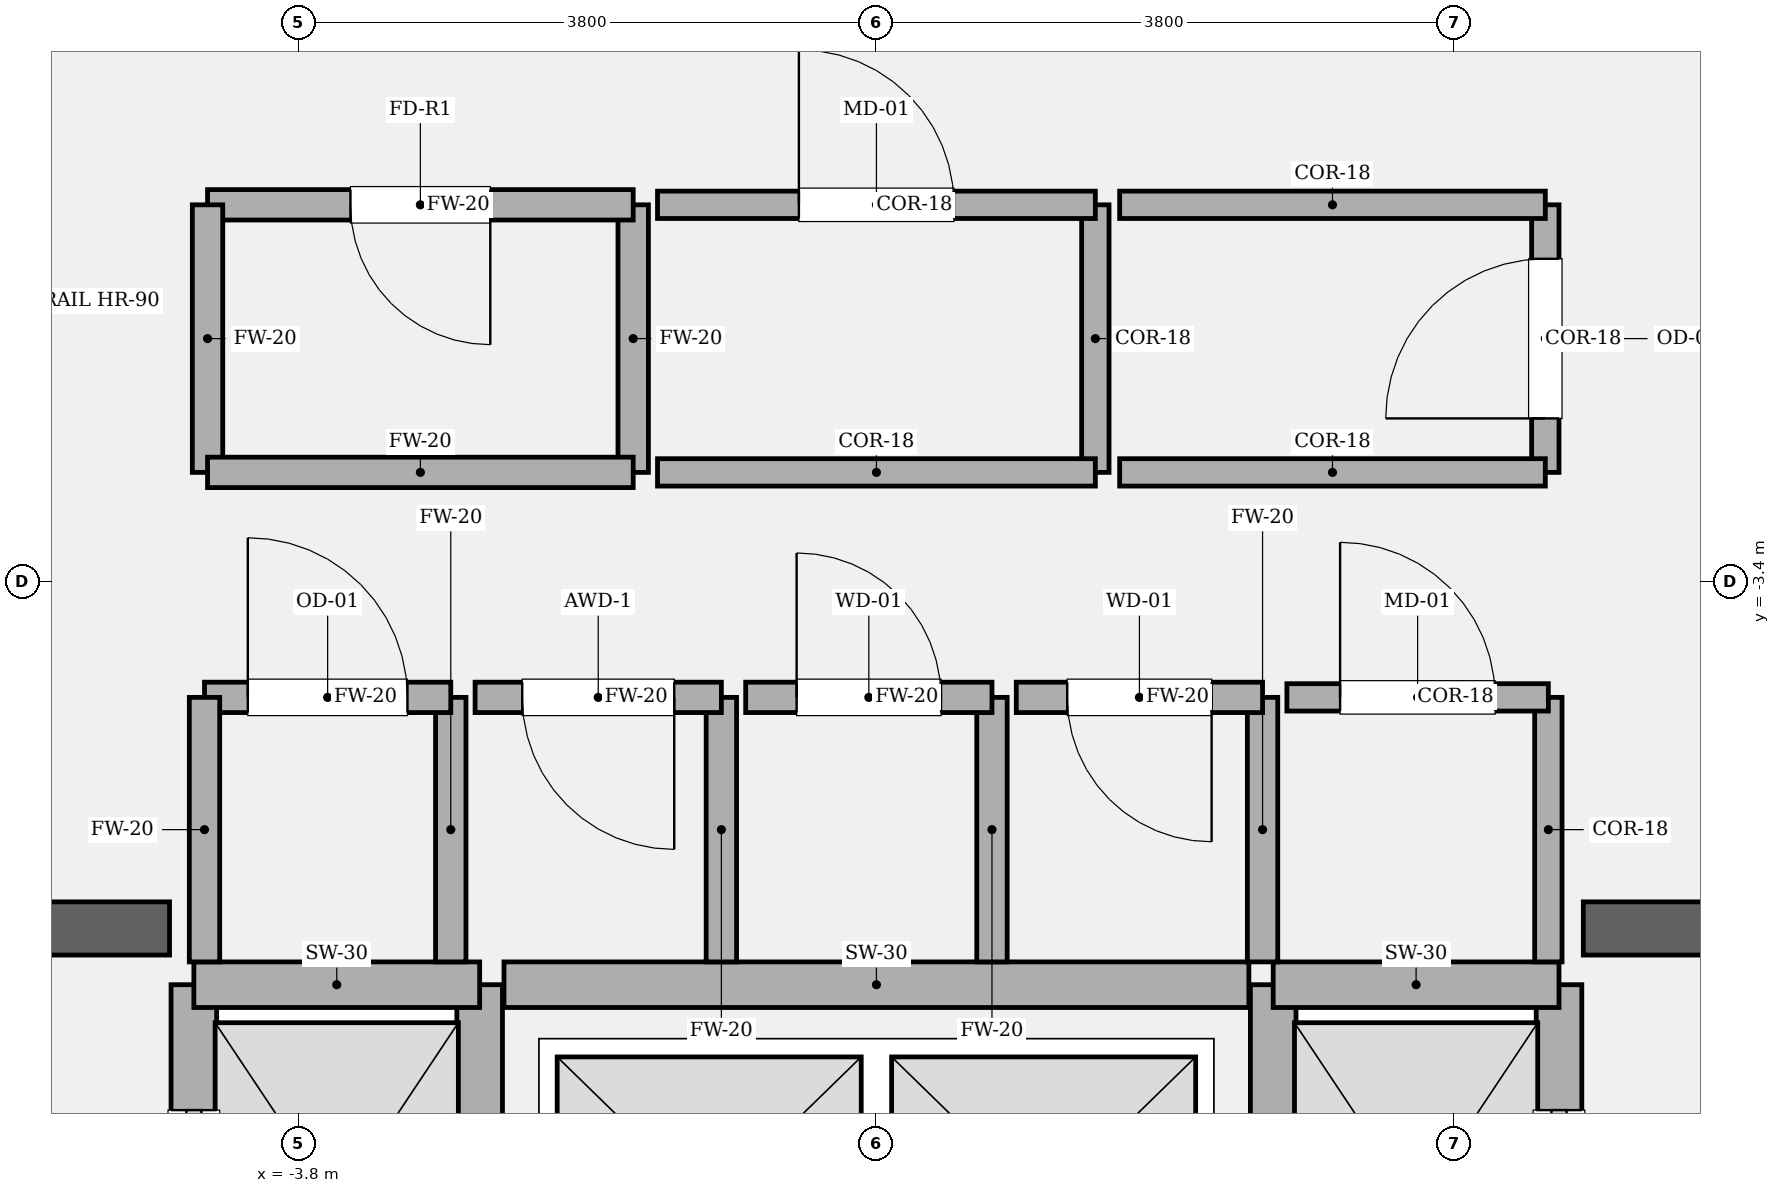
"""IFC4 building model, lengths in metres.
Left out: names, types, materials, properties, quantities, classifications, styles, units other than length and angle.
Written with IfcOpenShell. Run it as: python <this file> out.ifc"""

import sys

from ifc_helpers import new_model, si_unit, direction, frame, frame_2d, origin, place, context, subcontext, project, spatial, rectangle, extrude, element, fill, save


model = new_model("IFC4")
c1 = context("Model", 3, precision=1e-05, world=origin(), true_north=direction((0.0, 1.0)))
c2 = subcontext(c1, "Body", "Model", "MODEL_VIEW")
j1 = project(units=[si_unit("LENGTHUNIT", "METRE"), si_unit("PLANEANGLEUNIT", "RADIAN")], contexts=[c1])
p1 = place(None, origin())
s1 = spatial("IfcSite", under=j1, at=p1, CompositionType="ELEMENT")
p2 = place(p1, origin())
s2 = spatial("IfcBuilding", under=s1, at=p2, CompositionType="ELEMENT")
p3 = place(p2, frame((0.0, 0.0, 339.0)))
s3 = spatial("IfcBuildingStorey", under=s2, at=p3, CompositionType="ELEMENT", Elevation=339.0)
p4 = place(p3, frame((-9.975, -5.68, 0.0), z_axis=(0.0, 0.0, 1.0), x_axis=(1.0, 0.0, 0.0)))
e1 = element("IfcWall", 1, at=p4, inside=s3, PredefinedType="SOLIDWALL", context=c2, shape_type="SweptSolid", body=[
    extrude(rectangle(XDim=5.325, YDim=0.35, at=frame_2d((2.663, 0.0))), origin(), (0.0, 0.0, 1.0), 4.8),
])
p5 = place(p4, frame((1.435, 0.0, 0.0)))
e2 = element("IfcOpeningElement", 2, at=p5, cuts=e1, PredefinedType="OPENING", context=c2, shape_type="SweptSolid", body=[
    extrude(rectangle(XDim=1.18, YDim=2.2, at=frame_2d((0.59, 1.1))), frame((0.0, 0.185, 0.0), z_axis=(0.0, -1.0, 0.0), x_axis=(1.0, 0.0, 0.0)), (0.0, 0.0, 1.0), 0.37),
])
p6 = place(p3, frame((4.65, -5.68, 0.0), z_axis=(0.0, 0.0, 1.0), x_axis=(1.0, 0.0, 0.0)))
e3 = element("IfcWall", 3, at=p6, inside=s3, PredefinedType="SOLIDWALL", context=c2, shape_type="SweptSolid", body=[
    extrude(rectangle(XDim=5.325, YDim=0.35, at=frame_2d((2.663, 0.0))), origin(), (0.0, 0.0, 1.0), 4.8),
])
p7 = place(p6, frame((2.71, 0.0, 0.0)))
e4 = element("IfcOpeningElement", 4, at=p7, cuts=e3, PredefinedType="OPENING", context=c2, shape_type="SweptSolid", body=[
    extrude(rectangle(XDim=1.18, YDim=2.2, at=frame_2d((0.59, 1.1))), frame((0.0, 0.185, 0.0), z_axis=(0.0, -1.0, 0.0), x_axis=(1.0, 0.0, 0.0)), (0.0, 0.0, 1.0), 0.37),
])
p8 = place(p3, frame((-4.49, -8.82, 0.0), z_axis=(0.0, 0.0, 1.0), x_axis=(0.0, 1.0, 0.0)))
e5 = element("IfcWall", 5, at=p8, inside=s3, PredefinedType="SOLIDWALL", context=c2, shape_type="SweptSolid", body=[
    extrude(rectangle(XDim=2.77, YDim=0.3, at=frame_2d((1.385, 0.0))), origin(), (0.0, 0.0, 1.0), 4.52),
])
p9 = place(p8, frame((0.825, 0.0, 0.0)))
e6 = element("IfcOpeningElement", 6, at=p9, cuts=e5, PredefinedType="OPENING", context=c2, shape_type="SweptSolid", body=[
    extrude(rectangle(XDim=1.12, YDim=2.25, at=frame_2d((0.56, 1.125))), frame((0.0, 0.16, 0.0), z_axis=(0.0, -1.0, 0.0), x_axis=(1.0, 0.0, 0.0)), (0.0, 0.0, 1.0), 0.32),
])
p10 = place(p3, frame((-2.61, -8.82, 0.0), z_axis=(0.0, 0.0, 1.0), x_axis=(0.0, 1.0, 0.0)))
e7 = element("IfcWall", 7, at=p10, inside=s3, PredefinedType="SOLIDWALL", context=c2, shape_type="SweptSolid", body=[
    extrude(rectangle(XDim=2.77, YDim=0.3, at=frame_2d((1.385, 0.0))), origin(), (0.0, 0.0, 1.0), 4.52),
])
p11 = place(p3, frame((-4.49, -6.05, 0.0), z_axis=(0.0, 0.0, 1.0), x_axis=(1.0, 0.0, 0.0)))
e8 = element("IfcWall", 8, at=p11, inside=s3, PredefinedType="SOLIDWALL", context=c2, shape_type="SweptSolid", body=[
    extrude(rectangle(XDim=1.88, YDim=0.3, at=frame_2d((0.94, 0.0))), origin(), (0.0, 0.0, 1.0), 4.52),
])
p12 = place(p3, frame((4.49, -8.82, 0.0), z_axis=(0.0, 0.0, 1.0), x_axis=(0.0, 1.0, 0.0)))
e9 = element("IfcWall", 9, at=p12, inside=s3, PredefinedType="SOLIDWALL", context=c2, shape_type="SweptSolid", body=[
    extrude(rectangle(XDim=2.77, YDim=0.3, at=frame_2d((1.385, 0.0))), origin(), (0.0, 0.0, 1.0), 4.52),
])
p13 = place(p12, frame((0.825, 0.0, 0.0)))
e10 = element("IfcOpeningElement", 10, at=p13, cuts=e9, PredefinedType="OPENING", context=c2, shape_type="SweptSolid", body=[
    extrude(rectangle(XDim=1.12, YDim=2.25, at=frame_2d((0.56, 1.125))), frame((0.0, 0.16, 0.0), z_axis=(0.0, -1.0, 0.0), x_axis=(1.0, 0.0, 0.0)), (0.0, 0.0, 1.0), 0.32),
])
p14 = place(p3, frame((2.61, -8.82, 0.0), z_axis=(0.0, 0.0, 1.0), x_axis=(0.0, 1.0, 0.0)))
e11 = element("IfcWall", 11, at=p14, inside=s3, PredefinedType="SOLIDWALL", context=c2, shape_type="SweptSolid", body=[
    extrude(rectangle(XDim=2.77, YDim=0.3, at=frame_2d((1.385, 0.0))), origin(), (0.0, 0.0, 1.0), 4.52),
])
p15 = place(p3, frame((2.61, -6.05, 0.0), z_axis=(0.0, 0.0, 1.0), x_axis=(1.0, 0.0, 0.0)))
e12 = element("IfcWall", 12, at=p15, inside=s3, PredefinedType="SOLIDWALL", context=c2, shape_type="SweptSolid", body=[
    extrude(rectangle(XDim=1.88, YDim=0.3, at=frame_2d((0.94, 0.0))), origin(), (0.0, 0.0, 1.0), 4.52),
])
p16 = place(p3, frame((-2.45, -6.05, 0.0), z_axis=(0.0, 0.0, 1.0), x_axis=(1.0, 0.0, 0.0)))
e13 = element("IfcWall", 13, at=p16, inside=s3, PredefinedType="SOLIDWALL", context=c2, shape_type="SweptSolid", body=[
    extrude(rectangle(XDim=4.9, YDim=0.3, at=frame_2d((2.45, 0.0))), origin(), (0.0, 0.0, 1.0), 4.52),
])
p17 = place(p3, frame((-2.8, -5.9, 0.0), z_axis=(0.0, 0.0, 1.0), x_axis=(0.0, 1.0, 0.0)))
e14 = element("IfcWall", 14, at=p17, inside=s3, PredefinedType="SOLIDWALL", context=c2, shape_type="SweptSolid", body=[
    extrude(rectangle(XDim=1.74, YDim=0.2, at=frame_2d((0.87, 0.0))), origin(), (0.0, 0.0, 1.0), 4.52),
])
p18 = place(p3, frame((-2.8, -4.16, 0.0), z_axis=(0.0, 0.0, 1.0), x_axis=(-1.0, 0.0, 0.0)))
e15 = element("IfcWall", 15, at=p18, inside=s3, PredefinedType="SOLIDWALL", context=c2, shape_type="SweptSolid", body=[
    extrude(rectangle(XDim=1.62, YDim=0.2, at=frame_2d((0.81, 0.0))), origin(), (0.0, 0.0, 1.0), 4.52),
])
p19 = place(p18, frame((0.285, 0.0, 0.0)))
e16 = element("IfcOpeningElement", 16, at=p19, cuts=e15, PredefinedType="OPENING", context=c2, shape_type="SweptSolid", body=[
    extrude(rectangle(XDim=1.05, YDim=2.2, at=frame_2d((0.525, 1.1))), frame((0.0, 0.11, 0.0), z_axis=(0.0, -1.0, 0.0), x_axis=(1.0, 0.0, 0.0)), (0.0, 0.0, 1.0), 0.22),
])
for number, where, z_axis, x_axis in (
    (17, (-4.42, -4.16, 0.0), (0.0, 0.0, 1.0), (0.0, -1.0, 0.0)),
    (18, (-1.02, -5.9, 0.0), (0.0, 0.0, 1.0), (0.0, 1.0, 0.0)),
):
    element("IfcWall", number, at=place(p3, frame(where, z_axis=z_axis, x_axis=x_axis)), inside=s3, PredefinedType="SOLIDWALL", context=c2, shape_type="SweptSolid", body=[
        extrude(rectangle(XDim=1.74, YDim=0.2, at=frame_2d((0.87, 0.0))), origin(), (0.0, 0.0, 1.0), 4.52),
    ])
p20 = place(p3, frame((-1.02, -4.16, 0.0), z_axis=(0.0, 0.0, 1.0), x_axis=(-1.0, 0.0, 0.0)))
e19 = element("IfcWall", 19, at=p20, inside=s3, PredefinedType="SOLIDWALL", context=c2, shape_type="SweptSolid", body=[
    extrude(rectangle(XDim=1.62, YDim=0.2, at=frame_2d((0.81, 0.0))), origin(), (0.0, 0.0, 1.0), 4.52),
])
p21 = place(p20, frame((0.31, 0.0, 0.0)))
e20 = element("IfcOpeningElement", 20, at=p21, cuts=e19, PredefinedType="OPENING", context=c2, shape_type="SweptSolid", body=[
    extrude(rectangle(XDim=1.0, YDim=2.15, at=frame_2d((0.5, 1.075))), frame((0.0, 0.11, 0.0), z_axis=(0.0, -1.0, 0.0), x_axis=(1.0, 0.0, 0.0)), (0.0, 0.0, 1.0), 0.22),
])
p22 = place(p3, frame((0.76, -5.9, 0.0), z_axis=(0.0, 0.0, 1.0), x_axis=(0.0, 1.0, 0.0)))
e21 = element("IfcWall", 21, at=p22, inside=s3, PredefinedType="SOLIDWALL", context=c2, shape_type="SweptSolid", body=[
    extrude(rectangle(XDim=1.74, YDim=0.2, at=frame_2d((0.87, 0.0))), origin(), (0.0, 0.0, 1.0), 4.52),
])
p23 = place(p3, frame((0.76, -4.16, 0.0), z_axis=(0.0, 0.0, 1.0), x_axis=(-1.0, 0.0, 0.0)))
e22 = element("IfcWall", 22, at=p23, inside=s3, PredefinedType="SOLIDWALL", context=c2, shape_type="SweptSolid", body=[
    extrude(rectangle(XDim=1.62, YDim=0.2, at=frame_2d((0.81, 0.0))), origin(), (0.0, 0.0, 1.0), 4.52),
])
p24 = place(p23, frame((0.335, 0.0, 0.0)))
e23 = element("IfcOpeningElement", 23, at=p24, cuts=e22, PredefinedType="OPENING", context=c2, shape_type="SweptSolid", body=[
    extrude(rectangle(XDim=0.95, YDim=2.15, at=frame_2d((0.475, 1.075))), frame((0.0, 0.11, 0.0), z_axis=(0.0, -1.0, 0.0), x_axis=(1.0, 0.0, 0.0)), (0.0, 0.0, 1.0), 0.22),
])
p25 = place(p3, frame((2.54, -5.9, 0.0), z_axis=(0.0, 0.0, 1.0), x_axis=(0.0, 1.0, 0.0)))
e24 = element("IfcWall", 24, at=p25, inside=s3, PredefinedType="SOLIDWALL", context=c2, shape_type="SweptSolid", body=[
    extrude(rectangle(XDim=1.74, YDim=0.2, at=frame_2d((0.87, 0.0))), origin(), (0.0, 0.0, 1.0), 4.52),
])
p26 = place(p3, frame((2.54, -4.16, 0.0), z_axis=(0.0, 0.0, 1.0), x_axis=(-1.0, 0.0, 0.0)))
e25 = element("IfcWall", 25, at=p26, inside=s3, PredefinedType="SOLIDWALL", context=c2, shape_type="SweptSolid", body=[
    extrude(rectangle(XDim=1.62, YDim=0.2, at=frame_2d((0.81, 0.0))), origin(), (0.0, 0.0, 1.0), 4.52),
])
p27 = place(p26, frame((0.335, 0.0, 0.0)))
e26 = element("IfcOpeningElement", 26, at=p27, cuts=e25, PredefinedType="OPENING", context=c2, shape_type="SweptSolid", body=[
    extrude(rectangle(XDim=0.95, YDim=2.15, at=frame_2d((0.475, 1.075))), frame((0.0, 0.11, 0.0), z_axis=(0.0, -1.0, 0.0), x_axis=(1.0, 0.0, 0.0)), (0.0, 0.0, 1.0), 0.22),
])
p28 = place(p3, frame((4.42, -5.9, 0.0), z_axis=(0.0, 0.0, 1.0), x_axis=(0.0, 1.0, 0.0)))
e27 = element("IfcWall", 27, at=p28, inside=s3, PredefinedType="PARTITIONING", context=c2, shape_type="SweptSolid", body=[
    extrude(rectangle(XDim=1.74, YDim=0.18, at=frame_2d((0.87, 0.0))), origin(), (0.0, 0.0, 1.0), 4.52),
])
p29 = place(p3, frame((4.42, -4.16, 0.0), z_axis=(0.0, 0.0, 1.0), x_axis=(-1.0, 0.0, 0.0)))
e28 = element("IfcWall", 28, at=p29, inside=s3, PredefinedType="PARTITIONING", context=c2, shape_type="SweptSolid", body=[
    extrude(rectangle(XDim=1.72, YDim=0.18, at=frame_2d((0.86, 0.0))), origin(), (0.0, 0.0, 1.0), 4.52),
])
p30 = place(p29, frame((0.35, 0.0, 0.0)))
e29 = element("IfcOpeningElement", 29, at=p30, cuts=e28, PredefinedType="OPENING", context=c2, shape_type="SweptSolid", body=[
    extrude(rectangle(XDim=1.02, YDim=2.2, at=frame_2d((0.51, 1.1))), frame((0.0, 0.1, 0.0), z_axis=(0.0, -1.0, 0.0), x_axis=(1.0, 0.0, 0.0)), (0.0, 0.0, 1.0), 0.2),
])
p31 = place(p3, frame((-1.6, -2.68, 0.0), z_axis=(0.0, 0.0, 1.0), x_axis=(0.0, 1.0, 0.0)))
e30 = element("IfcWall", 30, at=p31, inside=s3, PredefinedType="SOLIDWALL", context=c2, shape_type="SweptSolid", body=[
    extrude(rectangle(XDim=1.76, YDim=0.2, at=frame_2d((0.88, 0.0))), origin(), (0.0, 0.0, 1.0), 4.52),
])
p32 = place(p3, frame((-1.6, -0.92, 0.0), z_axis=(0.0, 0.0, 1.0), x_axis=(-1.0, 0.0, 0.0)))
e31 = element("IfcWall", 31, at=p32, inside=s3, PredefinedType="SOLIDWALL", context=c2, shape_type="SweptSolid", body=[
    extrude(rectangle(XDim=2.8, YDim=0.2, at=frame_2d((1.4, 0.0))), origin(), (0.0, 0.0, 1.0), 4.52),
])
p33 = place(p32, frame((0.94, 0.0, 0.0)))
e32 = element("IfcOpeningElement", 32, at=p33, cuts=e31, PredefinedType="OPENING", context=c2, shape_type="SweptSolid", body=[
    extrude(rectangle(XDim=0.92, YDim=2.1, at=frame_2d((0.46, 1.05))), frame((0.0, 0.11, 0.0), z_axis=(0.0, -1.0, 0.0), x_axis=(1.0, 0.0, 0.0)), (0.0, 0.0, 1.0), 0.22),
])
p34 = place(p3, frame((-4.4, -0.92, 0.0), z_axis=(0.0, 0.0, 1.0), x_axis=(0.0, -1.0, 0.0)))
e33 = element("IfcWall", 33, at=p34, inside=s3, PredefinedType="SOLIDWALL", context=c2, shape_type="SweptSolid", body=[
    extrude(rectangle(XDim=1.76, YDim=0.2, at=frame_2d((0.88, 0.0))), origin(), (0.0, 0.0, 1.0), 4.52),
])
p35 = place(p3, frame((-4.4, -2.68, 0.0), z_axis=(0.0, 0.0, 1.0), x_axis=(1.0, 0.0, 0.0)))
e34 = element("IfcWall", 34, at=p35, inside=s3, PredefinedType="SOLIDWALL", context=c2, shape_type="SweptSolid", body=[
    extrude(rectangle(XDim=2.8, YDim=0.2, at=frame_2d((1.4, 0.0))), origin(), (0.0, 0.0, 1.0), 4.52),
])
p36 = place(p3, frame((1.44, -2.68, 0.0), z_axis=(0.0, 0.0, 1.0), x_axis=(0.0, 1.0, 0.0)))
e35 = element("IfcWall", 35, at=p36, inside=s3, PredefinedType="PARTITIONING", context=c2, shape_type="SweptSolid", body=[
    extrude(rectangle(XDim=1.76, YDim=0.18, at=frame_2d((0.88, 0.0))), origin(), (0.0, 0.0, 1.0), 4.52),
])
p37 = place(p3, frame((1.44, -0.92, 0.0), z_axis=(0.0, 0.0, 1.0), x_axis=(-1.0, 0.0, 0.0)))
e36 = element("IfcWall", 36, at=p37, inside=s3, PredefinedType="PARTITIONING", context=c2, shape_type="SweptSolid", body=[
    extrude(rectangle(XDim=2.88, YDim=0.18, at=frame_2d((1.44, 0.0))), origin(), (0.0, 0.0, 1.0), 4.52),
])
p38 = place(p37, frame((0.93, 0.0, 0.0)))
e37 = element("IfcOpeningElement", 37, at=p38, cuts=e36, PredefinedType="OPENING", context=c2, shape_type="SweptSolid", body=[
    extrude(rectangle(XDim=1.02, YDim=2.2, at=frame_2d((0.51, 1.1))), frame((0.0, 0.1, 0.0), z_axis=(0.0, -1.0, 0.0), x_axis=(1.0, 0.0, 0.0)), (0.0, 0.0, 1.0), 0.2),
])
p39 = place(p3, frame((-1.44, -2.68, 0.0), z_axis=(0.0, 0.0, 1.0), x_axis=(1.0, 0.0, 0.0)))
e38 = element("IfcWall", 38, at=p39, inside=s3, PredefinedType="PARTITIONING", context=c2, shape_type="SweptSolid", body=[
    extrude(rectangle(XDim=2.88, YDim=0.18, at=frame_2d((1.44, 0.0))), origin(), (0.0, 0.0, 1.0), 4.52),
])
p40 = place(p3, frame((4.4, -2.68, 0.0), z_axis=(0.0, 0.0, 1.0), x_axis=(0.0, 1.0, 0.0)))
e39 = element("IfcWall", 39, at=p40, inside=s3, PredefinedType="PARTITIONING", context=c2, shape_type="SweptSolid", body=[
    extrude(rectangle(XDim=1.76, YDim=0.18, at=frame_2d((0.88, 0.0))), origin(), (0.0, 0.0, 1.0), 4.52),
])
p41 = place(p40, frame((0.355, 0.0, 0.0)))
e40 = element("IfcOpeningElement", 40, at=p41, cuts=e39, PredefinedType="OPENING", context=c2, shape_type="SweptSolid", body=[
    extrude(rectangle(XDim=1.05, YDim=2.2, at=frame_2d((0.525, 1.1))), frame((0.0, 0.1, 0.0), z_axis=(0.0, -1.0, 0.0), x_axis=(1.0, 0.0, 0.0)), (0.0, 0.0, 1.0), 0.2),
])
for number, where, z_axis, x_axis in (
    (41, (4.4, -0.92, 0.0), (0.0, 0.0, 1.0), (-1.0, 0.0, 0.0)),
    (42, (1.6, -2.68, 0.0), (0.0, 0.0, 1.0), (1.0, 0.0, 0.0)),
):
    element("IfcWall", number, at=place(p3, frame(where, z_axis=z_axis, x_axis=x_axis)), inside=s3, PredefinedType="PARTITIONING", context=c2, shape_type="SweptSolid", body=[
        extrude(rectangle(XDim=2.8, YDim=0.18, at=frame_2d((1.4, 0.0))), origin(), (0.0, 0.0, 1.0), 4.52),
    ])
p42 = place(p9, origin())
e43 = element("IfcDoor", 43, at=p42, inside=s3, OperationType="SLIDING_TO_LEFT", PredefinedType="DOOR", context=c2, shape_type="SweptSolid", body=[
    extrude(rectangle(XDim=1.12, YDim=2.25, at=frame_2d((0.56, 1.125))), frame((0.0, 0.025, 0.0), z_axis=(0.0, -1.0, 0.0), x_axis=(1.0, 0.0, 0.0)), (0.0, 0.0, 1.0), 0.05),
])
fill(e6, e43)
p43 = place(p13, origin())
e44 = element("IfcDoor", 44, at=p43, inside=s3, OperationType="SLIDING_TO_RIGHT", PredefinedType="DOOR", context=c2, shape_type="SweptSolid", body=[
    extrude(rectangle(XDim=1.12, YDim=2.25, at=frame_2d((0.56, 1.125))), frame((0.0, 0.025, 0.0), z_axis=(0.0, -1.0, 0.0), x_axis=(1.0, 0.0, 0.0)), (0.0, 0.0, 1.0), 0.05),
])
fill(e10, e44)
p44 = place(p19, origin())
e45 = element("IfcDoor", 45, at=p44, inside=s3, OperationType="SINGLE_SWING_RIGHT", PredefinedType="DOOR", context=c2, shape_type="SweptSolid", body=[
    extrude(rectangle(XDim=1.05, YDim=2.2, at=frame_2d((0.525, 1.1))), frame((0.0, 0.025, 0.0), z_axis=(0.0, -1.0, 0.0), x_axis=(1.0, 0.0, 0.0)), (0.0, 0.0, 1.0), 0.05),
])
fill(e16, e45)
p45 = place(p21, origin())
e46 = element("IfcDoor", 46, at=p45, inside=s3, OperationType="SINGLE_SWING_LEFT", PredefinedType="DOOR", context=c2, shape_type="SweptSolid", body=[
    extrude(rectangle(XDim=1.0, YDim=2.15, at=frame_2d((0.5, 1.075))), frame((0.0, 0.025, 0.0), z_axis=(0.0, -1.0, 0.0), x_axis=(1.0, 0.0, 0.0)), (0.0, 0.0, 1.0), 0.05),
])
fill(e20, e46)
p46 = place(p24, origin())
e47 = element("IfcDoor", 47, at=p46, inside=s3, OperationType="SINGLE_SWING_RIGHT", PredefinedType="DOOR", context=c2, shape_type="SweptSolid", body=[
    extrude(rectangle(XDim=0.95, YDim=2.15, at=frame_2d((0.475, 1.075))), frame((0.0, 0.025, 0.0), z_axis=(0.0, -1.0, 0.0), x_axis=(1.0, 0.0, 0.0)), (0.0, 0.0, 1.0), 0.05),
])
fill(e23, e47)
p47 = place(p27, origin())
e48 = element("IfcDoor", 48, at=p47, inside=s3, OperationType="SINGLE_SWING_LEFT", PredefinedType="DOOR", context=c2, shape_type="SweptSolid", body=[
    extrude(rectangle(XDim=0.95, YDim=2.15, at=frame_2d((0.475, 1.075))), frame((0.0, 0.025, 0.0), z_axis=(0.0, -1.0, 0.0), x_axis=(1.0, 0.0, 0.0)), (0.0, 0.0, 1.0), 0.05),
])
fill(e26, e48)
p48 = place(p30, origin())
e49 = element("IfcDoor", 49, at=p48, inside=s3, OperationType="SINGLE_SWING_RIGHT", PredefinedType="DOOR", context=c2, shape_type="SweptSolid", body=[
    extrude(rectangle(XDim=1.02, YDim=2.2, at=frame_2d((0.51, 1.1))), frame((0.0, 0.025, 0.0), z_axis=(0.0, -1.0, 0.0), x_axis=(1.0, 0.0, 0.0)), (0.0, 0.0, 1.0), 0.05),
])
fill(e29, e49)
p49 = place(p33, origin())
e50 = element("IfcDoor", 50, at=p49, inside=s3, OperationType="SINGLE_SWING_LEFT", PredefinedType="DOOR", context=c2, shape_type="SweptSolid", body=[
    extrude(rectangle(XDim=0.92, YDim=2.1, at=frame_2d((0.46, 1.05))), frame((0.0, 0.025, 0.0), z_axis=(0.0, -1.0, 0.0), x_axis=(1.0, 0.0, 0.0)), (0.0, 0.0, 1.0), 0.05),
])
fill(e32, e50)
p50 = place(p38, origin())
e51 = element("IfcDoor", 51, at=p50, inside=s3, OperationType="SINGLE_SWING_RIGHT", PredefinedType="DOOR", context=c2, shape_type="SweptSolid", body=[
    extrude(rectangle(XDim=1.02, YDim=2.2, at=frame_2d((0.51, 1.1))), frame((0.0, 0.025, 0.0), z_axis=(0.0, -1.0, 0.0), x_axis=(1.0, 0.0, 0.0)), (0.0, 0.0, 1.0), 0.05),
])
fill(e37, e51)
p51 = place(p41, origin())
e52 = element("IfcDoor", 52, at=p51, inside=s3, OperationType="SINGLE_SWING_LEFT", PredefinedType="DOOR", context=c2, shape_type="SweptSolid", body=[
    extrude(rectangle(XDim=1.05, YDim=2.2, at=frame_2d((0.525, 1.1))), frame((0.0, 0.025, 0.0), z_axis=(0.0, -1.0, 0.0), x_axis=(1.0, 0.0, 0.0)), (0.0, 0.0, 1.0), 0.05),
])
fill(e40, e52)
save(model, sys.argv[1])
